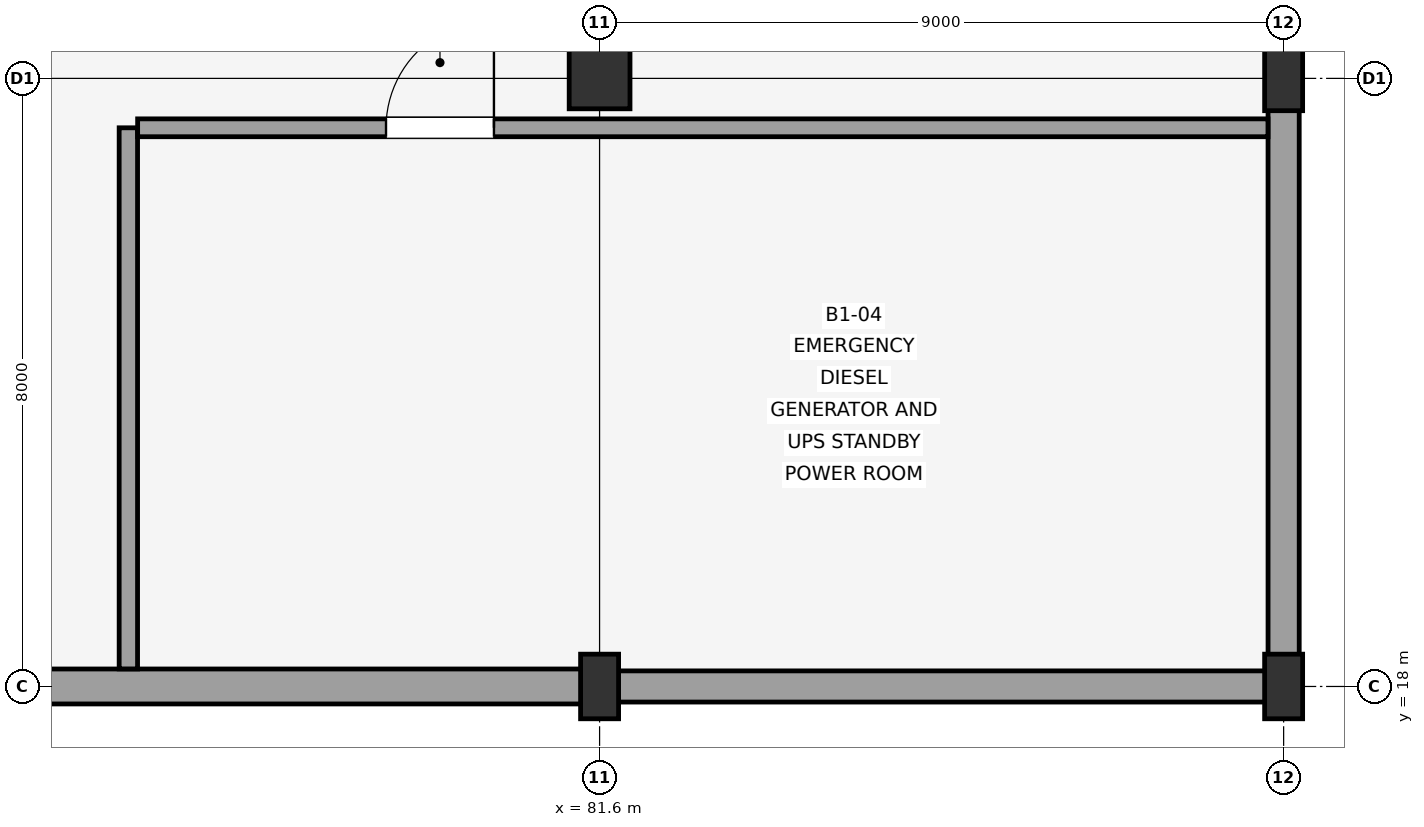
"""IFC4 building model, lengths in metres.
Left out: names, types, materials, properties, quantities, classifications, styles, units other than length and angle.
Written with IfcOpenShell. Run it as: python <this file> out.ifc"""

import sys

from ifc_helpers import new_model, si_unit, direction, frame, frame_2d, origin, origin_2d, place, context, subcontext, project, spatial, rectangle, extrude, element, fill, save


model = new_model("IFC4")
c1 = context("Model", 3, precision=1e-05, world=origin(), true_north=direction((0.0, 1.0)))
c2 = subcontext(c1, "Body", "Model", "MODEL_VIEW")
j1 = project(units=[si_unit("LENGTHUNIT", "METRE"), si_unit("PLANEANGLEUNIT", "RADIAN")], contexts=[c1])
p1 = place(None, origin())
s1 = spatial("IfcSite", under=j1, at=p1, CompositionType="ELEMENT")
p2 = place(p1, origin())
s2 = spatial("IfcBuilding", under=s1, at=p2, CompositionType="ELEMENT")
p3 = place(p2, frame((0.0, 0.0, -4.8)))
s3 = spatial("IfcBuildingStorey", under=s2, at=p3, CompositionType="ELEMENT", Elevation=-4.8)
p4 = place(p3, frame((81.6, 18.0, 0.0), z_axis=(0.0, 0.0, 1.0), x_axis=(1.0, 0.0, 0.0)))
e1 = element("IfcColumn", 1, at=p4, inside=s3, PredefinedType="COLUMN", context=c2, shape_type="SweptSolid", body=[
    extrude(rectangle(XDim=0.5, YDim=0.85, at=origin_2d()), origin(), (0.0, 0.0, 1.0), 4.8),
])
p5 = place(p3, frame((81.6, 26.0, 0.0), z_axis=(0.0, 0.0, 1.0), x_axis=(1.0, 0.0, 0.0)))
e2 = element("IfcColumn", 2, at=p5, inside=s3, PredefinedType="COLUMN", context=c2, shape_type="SweptSolid", body=[
    extrude(rectangle(XDim=0.8, YDim=0.8, at=origin_2d()), origin(), (0.0, 0.0, 1.0), 4.8),
])
for number, where, z_axis, x_axis in (
    (3, (90.6, 18.0, 0.0), (0.0, 0.0, 1.0), (1.0, 0.0, 0.0)),
    (4, (90.6, 26.0, 0.0), (0.0, 0.0, 1.0), (1.0, 0.0, 0.0)),
):
    element("IfcColumn", number, at=place(p3, frame(where, z_axis=z_axis, x_axis=x_axis)), inside=s3, PredefinedType="COLUMN", context=c2, shape_type="SweptSolid", body=[
        extrude(rectangle(XDim=0.5, YDim=0.85, at=origin_2d()), origin(), (0.0, 0.0, 1.0), 4.8),
    ])
p6 = place(p3, frame((72.6, 18.0, 0.0), z_axis=(0.0, 0.0, 1.0), x_axis=(1.0, 0.0, 0.0)))
e5 = element("IfcWall", 5, at=p6, inside=s3, PredefinedType="USERDEFINED", context=c2, shape_type="SweptSolid", body=[
    extrude(rectangle(XDim=9.0, YDim=0.46, at=frame_2d((4.5, 0.0))), origin(), (0.0, 0.0, 1.0), 3.42),
])
p7 = place(p3, frame((81.6, 18.0, 0.0), z_axis=(0.0, 0.0, 1.0), x_axis=(1.0, 0.0, 0.0)))
e6 = element("IfcWall", 6, at=p7, inside=s3, PredefinedType="USERDEFINED", context=c2, shape_type="SweptSolid", body=[
    extrude(rectangle(XDim=9.0, YDim=0.41, at=frame_2d((4.5, 0.0))), origin(), (0.0, 0.0, 1.0), 3.42),
])
p8 = place(p3, frame((90.6, 18.206, 0.0), z_axis=(0.0, 0.0, 1.0), x_axis=(0.0, 1.0, 0.0)))
e7 = element("IfcWall", 7, at=p8, inside=s3, PredefinedType="USERDEFINED", context=c2, shape_type="SweptSolid", body=[
    extrude(rectangle(XDim=7.794, YDim=0.41, at=frame_2d((3.897, 0.0))), origin(), (0.0, 0.0, 1.0), 3.42),
])
p9 = place(p3, frame((90.6, 26.0, 0.0), z_axis=(0.0, 0.0, 1.0), x_axis=(0.0, 1.0, 0.0)))
e8 = element("IfcWall", 8, at=p9, inside=s3, PredefinedType="USERDEFINED", context=c2, shape_type="SweptSolid", body=[
    extrude(rectangle(XDim=8.0, YDim=0.46, at=frame_2d((4.0, 0.0))), origin(), (0.0, 0.0, 1.0), 3.42),
])
p10 = place(p3, frame((75.4, 18.231, 0.0), z_axis=(0.0, 0.0, 1.0), x_axis=(0.0, 1.0, 0.0)))
e9 = element("IfcWall", 9, at=p10, inside=s3, PredefinedType="SOLIDWALL", context=c2, shape_type="SweptSolid", body=[
    extrude(rectangle(XDim=7.119, YDim=0.242, at=frame_2d((3.56, 0.0))), origin(), (0.0, 0.0, 1.0), 2.7),
])
p11 = place(p3, frame((75.522, 25.35, 0.0), z_axis=(0.0, 0.0, 1.0), x_axis=(1.0, 0.0, 0.0)))
e10 = element("IfcWall", 10, at=p11, inside=s3, PredefinedType="PARTITIONING", context=c2, shape_type="SweptSolid", body=[
    extrude(rectangle(XDim=14.872, YDim=0.235, at=frame_2d((7.436, 0.0))), origin(), (0.0, 0.0, 1.0), 2.7),
])
p12 = place(p11, frame((3.268, 0.0, 0.0)))
e11 = element("IfcOpeningElement", 11, at=p12, cuts=e10, PredefinedType="OPENING", context=c2, shape_type="SweptSolid", body=[
    extrude(rectangle(XDim=1.42, YDim=2.2, at=frame_2d((0.71, 1.1))), frame((0.0, 0.127, 0.0), z_axis=(0.0, -1.0, 0.0), x_axis=(1.0, 0.0, 0.0)), (0.0, 0.0, 1.0), 0.255),
])
p13 = place(p12, origin())
e12 = element("IfcDoor", 12, at=p13, inside=s3, OperationType="SINGLE_SWING_RIGHT", PredefinedType="DOOR", context=c2, shape_type="SweptSolid", body=[
    extrude(rectangle(XDim=1.42, YDim=2.2, at=frame_2d((0.71, 1.1))), frame((0.0, 0.025, 0.0), z_axis=(0.0, -1.0, 0.0), x_axis=(1.0, 0.0, 0.0)), (0.0, 0.0, 1.0), 0.05),
])
fill(e11, e12)
save(model, sys.argv[1])
